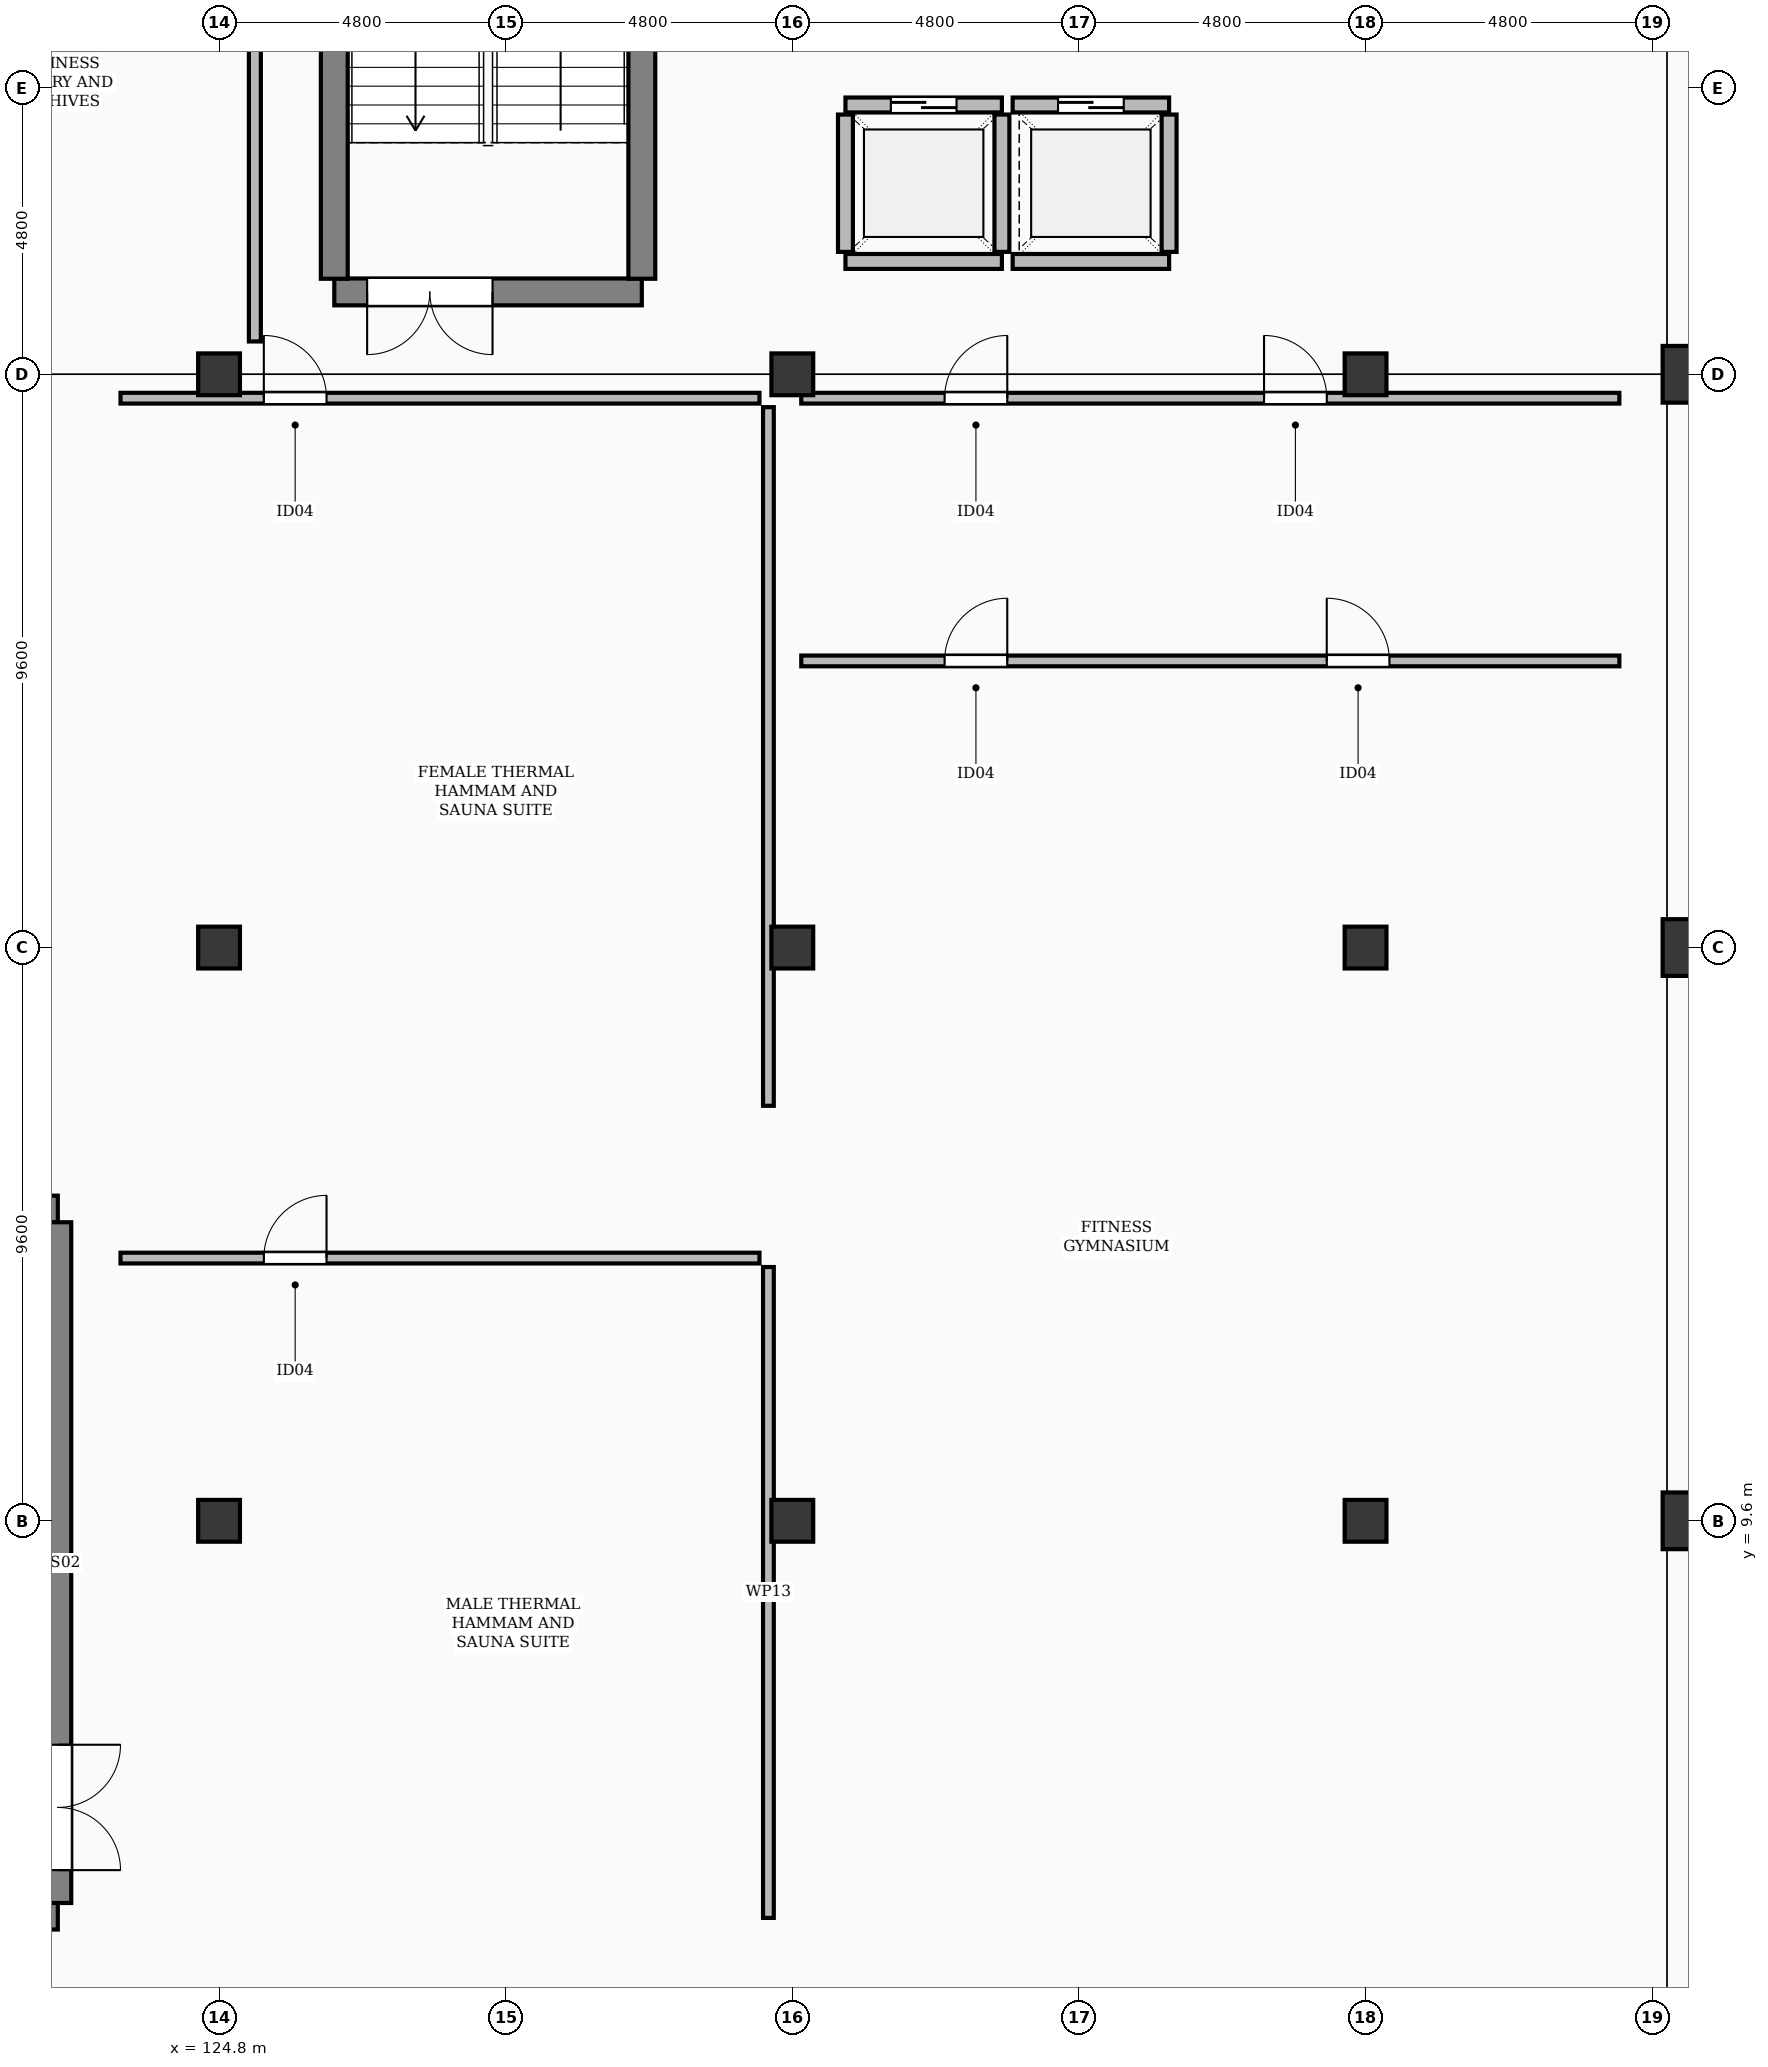
"""IFC4 building model, lengths in metres.
Left out: names, types, materials, properties, quantities, classifications, styles, units other than length and angle.
Written with IfcOpenShell. Run it as: python <this file> out.ifc"""

import sys

from ifc_helpers import new_model, si_unit, direction, frame, frame_2d, origin, origin_2d, place, context, subcontext, project, spatial, rectangle, extrude, element, fill, save


model = new_model("IFC4")
c1 = context("Model", 3, precision=1e-05, world=origin(), true_north=direction((0.0, 1.0)))
c2 = subcontext(c1, "Body", "Model", "MODEL_VIEW")
j1 = project(units=[si_unit("LENGTHUNIT", "METRE"), si_unit("PLANEANGLEUNIT", "RADIAN")], contexts=[c1])
p1 = place(None, origin())
s1 = spatial("IfcSite", under=j1, at=p1, CompositionType="ELEMENT")
p2 = place(p1, origin())
s2 = spatial("IfcBuilding", under=s1, at=p2, CompositionType="ELEMENT")
p3 = place(p2, frame((0.0, 0.0, 11.4)))
s3 = spatial("IfcBuildingStorey", under=s2, at=p3, CompositionType="ELEMENT", Elevation=11.4)
for number, where, z_axis, x_axis in (
    (1, (124.8, 9.6, 0.0), (0.0, 0.0, 1.0), (1.0, 0.0, 0.0)),
    (2, (124.8, 19.2, 0.0), (0.0, 0.0, 1.0), (1.0, 0.0, 0.0)),
    (3, (124.8, 28.8, 0.0), (0.0, 0.0, 1.0), (1.0, 0.0, 0.0)),
    (4, (134.4, 9.6, 0.0), (0.0, 0.0, 1.0), (1.0, 0.0, 0.0)),
    (5, (134.4, 19.2, 0.0), (0.0, 0.0, 1.0), (1.0, 0.0, 0.0)),
    (6, (134.4, 28.8, 0.0), (0.0, 0.0, 1.0), (1.0, 0.0, 0.0)),
    (7, (144.0, 9.6, 0.0), (0.0, 0.0, 1.0), (1.0, 0.0, 0.0)),
    (8, (144.0, 19.2, 0.0), (0.0, 0.0, 1.0), (1.0, 0.0, 0.0)),
    (9, (144.0, 28.8, 0.0), (0.0, 0.0, 1.0), (1.0, 0.0, 0.0)),
):
    element("IfcColumn", number, at=place(p3, frame(where, z_axis=z_axis, x_axis=x_axis)), inside=s3, PredefinedType="COLUMN", context=c2, shape_type="SweptSolid", body=[
        extrude(rectangle(XDim=0.7, YDim=0.7, at=origin_2d()), origin(), (0.0, 0.0, 1.0), 4.8),
    ])
for number, where, z_axis, x_axis in (
    (10, (149.45, 9.6, 0.0), (0.0, 0.0, 1.0), (1.0, 0.0, 0.0)),
    (11, (149.45, 19.2, 0.0), (0.0, 0.0, 1.0), (1.0, 0.0, 0.0)),
    (12, (149.45, 28.8, 0.0), (0.0, 0.0, 1.0), (1.0, 0.0, 0.0)),
):
    element("IfcColumn", number, at=place(p3, frame(where, z_axis=z_axis, x_axis=x_axis)), inside=s3, PredefinedType="COLUMN", context=c2, shape_type="SweptSolid", body=[
        extrude(rectangle(XDim=0.95, YDim=0.95, at=origin_2d()), origin(), (0.0, 0.0, 1.0), 4.8),
    ])
p4 = place(p3, frame((126.73, 30.18, 0.0), z_axis=(0.0, 0.0, 1.0), x_axis=(1.0, 0.0, 0.0)))
e13 = element("IfcWall", 13, at=p4, inside=s3, PredefinedType="SHEAR", context=c2, shape_type="SweptSolid", body=[
    extrude(rectangle(XDim=5.15, YDim=0.45, at=frame_2d((2.575, 0.0))), origin(), (0.0, 0.0, 1.0), 4.42),
])
p5 = place(p4, frame((0.55, 0.0, 0.0)))
e14 = element("IfcOpeningElement", 14, at=p5, cuts=e13, PredefinedType="OPENING", context=c2, shape_type="SweptSolid", body=[
    extrude(rectangle(XDim=2.1, YDim=2.2, at=frame_2d((1.05, 1.1))), frame((0.0, 0.237, 0.0), z_axis=(0.0, -1.0, 0.0), x_axis=(1.0, 0.0, 0.0)), (0.0, 0.0, 1.0), 0.474),
])
for number, where, z_axis, x_axis in (
    (15, (126.73, 30.4, 0.0), (0.0, 0.0, 1.0), (0.0, 1.0, 0.0)),
    (16, (131.88, 30.4, 0.0), (0.0, 0.0, 1.0), (0.0, 1.0, 0.0)),
):
    element("IfcWall", number, at=place(p3, frame(where, z_axis=z_axis, x_axis=x_axis)), inside=s3, PredefinedType="SHEAR", context=c2, shape_type="SweptSolid", body=[
        extrude(rectangle(XDim=11.6, YDim=0.45, at=frame_2d((5.8, 0.0))), origin(), (0.0, 0.0, 1.0), 4.42),
    ])
p6 = place(p3, frame((135.29, 30.69, 0.0), z_axis=(0.0, 0.0, 1.0), x_axis=(1.0, 0.0, 0.0)))
e17 = element("IfcWall", 17, at=p6, inside=s3, PredefinedType="SOLIDWALL", context=c2, shape_type="SweptSolid", body=[
    extrude(rectangle(XDim=2.62, YDim=0.25, at=frame_2d((1.31, 0.0))), origin(), (0.0, 0.0, 1.0), 4.42),
])
p7 = place(p3, frame((135.29, 33.31, 0.0), z_axis=(0.0, 0.0, 1.0), x_axis=(1.0, 0.0, 0.0)))
e18 = element("IfcWall", 18, at=p7, inside=s3, PredefinedType="SOLIDWALL", context=c2, shape_type="SweptSolid", body=[
    extrude(rectangle(XDim=2.62, YDim=0.25, at=frame_2d((1.31, 0.0))), origin(), (0.0, 0.0, 1.0), 4.42),
])
p8 = place(p7, frame((0.76, 0.0, 0.0)))
e19 = element("IfcOpeningElement", 19, at=p8, cuts=e18, PredefinedType="OPENING", context=c2, shape_type="SweptSolid", body=[
    extrude(rectangle(XDim=1.1, YDim=2.2, at=frame_2d((0.55, 1.1))), frame((0.0, 0.137, 0.0), z_axis=(0.0, -1.0, 0.0), x_axis=(1.0, 0.0, 0.0)), (0.0, 0.0, 1.0), 0.274),
])
for number, where, z_axis, x_axis in (
    (20, (135.29, 30.85, 0.0), (0.0, 0.0, 1.0), (0.0, 1.0, 0.0)),
    (21, (137.91, 30.85, 0.0), (0.0, 0.0, 1.0), (0.0, 1.0, 0.0)),
):
    element("IfcWall", number, at=place(p3, frame(where, z_axis=z_axis, x_axis=x_axis)), inside=s3, PredefinedType="SOLIDWALL", context=c2, shape_type="SweptSolid", body=[
        extrude(rectangle(XDim=2.3, YDim=0.25, at=frame_2d((1.15, 0.0))), origin(), (0.0, 0.0, 1.0), 4.42),
    ])
p9 = place(p3, frame((138.09, 30.69, 0.0), z_axis=(0.0, 0.0, 1.0), x_axis=(1.0, 0.0, 0.0)))
e22 = element("IfcWall", 22, at=p9, inside=s3, PredefinedType="SOLIDWALL", context=c2, shape_type="SweptSolid", body=[
    extrude(rectangle(XDim=2.62, YDim=0.25, at=frame_2d((1.31, 0.0))), origin(), (0.0, 0.0, 1.0), 4.42),
])
p10 = place(p3, frame((138.09, 33.31, 0.0), z_axis=(0.0, 0.0, 1.0), x_axis=(1.0, 0.0, 0.0)))
e23 = element("IfcWall", 23, at=p10, inside=s3, PredefinedType="SOLIDWALL", context=c2, shape_type="SweptSolid", body=[
    extrude(rectangle(XDim=2.62, YDim=0.25, at=frame_2d((1.31, 0.0))), origin(), (0.0, 0.0, 1.0), 4.42),
])
p11 = place(p10, frame((0.76, 0.0, 0.0)))
e24 = element("IfcOpeningElement", 24, at=p11, cuts=e23, PredefinedType="OPENING", context=c2, shape_type="SweptSolid", body=[
    extrude(rectangle(XDim=1.1, YDim=2.2, at=frame_2d((0.55, 1.1))), frame((0.0, 0.137, 0.0), z_axis=(0.0, -1.0, 0.0), x_axis=(1.0, 0.0, 0.0)), (0.0, 0.0, 1.0), 0.274),
])
p12 = place(p3, frame((140.71, 30.85, 0.0), z_axis=(0.0, 0.0, 1.0), x_axis=(0.0, 1.0, 0.0)))
e25 = element("IfcWall", 25, at=p12, inside=s3, PredefinedType="SOLIDWALL", context=c2, shape_type="SweptSolid", body=[
    extrude(rectangle(XDim=2.3, YDim=0.25, at=frame_2d((1.15, 0.0))), origin(), (0.0, 0.0, 1.0), 4.42),
])
for number, where, z_axis, x_axis in (
    (26, (116.95, 2.98, 0.0), (0.0, 0.0, 1.0), (1.0, 0.0, 0.0)),
    (27, (116.95, 14.82, 0.0), (0.0, 0.0, 1.0), (1.0, 0.0, 0.0)),
):
    element("IfcWall", number, at=place(p3, frame(where, z_axis=z_axis, x_axis=x_axis)), inside=s3, PredefinedType="SHEAR", context=c2, shape_type="SweptSolid", body=[
        extrude(rectangle(XDim=5.15, YDim=0.45, at=frame_2d((2.575, 0.0))), origin(), (0.0, 0.0, 1.0), 4.42),
    ])
p13 = place(p3, frame((122.1, 3.2, 0.0), z_axis=(0.0, 0.0, 1.0), x_axis=(0.0, 1.0, 0.0)))
e28 = element("IfcWall", 28, at=p13, inside=s3, PredefinedType="SHEAR", context=c2, shape_type="SweptSolid", body=[
    extrude(rectangle(XDim=11.4, YDim=0.45, at=frame_2d((5.7, 0.0))), origin(), (0.0, 0.0, 1.0), 4.42),
])
p14 = place(p13, frame((0.55, 0.0, 0.0)))
e29 = element("IfcOpeningElement", 29, at=p14, cuts=e28, PredefinedType="OPENING", context=c2, shape_type="SweptSolid", body=[
    extrude(rectangle(XDim=2.1, YDim=2.2, at=frame_2d((1.05, 1.1))), frame((0.0, 0.237, 0.0), z_axis=(0.0, -1.0, 0.0), x_axis=(1.0, 0.0, 0.0)), (0.0, 0.0, 1.0), 0.474),
])
p15 = place(p3, frame((125.4, 29.35, 0.0), z_axis=(0.0, 0.0, 1.0), x_axis=(0.0, 1.0, 0.0)))
e30 = element("IfcWall", 30, at=p15, inside=s3, PredefinedType="PARTITIONING", context=c2, shape_type="SweptSolid", body=[
    extrude(rectangle(XDim=11.1, YDim=0.2, at=frame_2d((5.55, 0.0))), origin(), (0.0, 0.0, 1.0), 4.42),
])
p16 = place(p3, frame((123.15, 14.0, 0.0), z_axis=(0.0, 0.0, 1.0), x_axis=(1.0, 0.0, 0.0)))
e31 = element("IfcWall", 31, at=p16, inside=s3, PredefinedType="PARTITIONING", context=c2, shape_type="SweptSolid", body=[
    extrude(rectangle(XDim=10.7, YDim=0.18, at=frame_2d((5.35, 0.0))), origin(), (0.0, 0.0, 1.0), 3.692),
])
p17 = place(p16, frame((2.4, 0.0, 0.0)))
e32 = element("IfcOpeningElement", 32, at=p17, cuts=e31, PredefinedType="OPENING", context=c2, shape_type="SweptSolid", body=[
    extrude(rectangle(XDim=1.05, YDim=2.18, at=frame_2d((0.525, 1.09))), frame((0.0, 0.102, 0.0), z_axis=(0.0, -1.0, 0.0), x_axis=(1.0, 0.0, 0.0)), (0.0, 0.0, 1.0), 0.204),
])
p18 = place(p3, frame((134.0, 2.95, 0.0), z_axis=(0.0, 0.0, 1.0), x_axis=(0.0, 1.0, 0.0)))
e33 = element("IfcWall", 33, at=p18, inside=s3, PredefinedType="PARTITIONING", context=c2, shape_type="SweptSolid", body=[
    extrude(rectangle(XDim=10.9, YDim=0.18, at=frame_2d((5.45, 0.0))), origin(), (0.0, 0.0, 1.0), 3.692),
])
p19 = place(p3, frame((123.15, 28.4, 0.0), z_axis=(0.0, 0.0, 1.0), x_axis=(1.0, 0.0, 0.0)))
e34 = element("IfcWall", 34, at=p19, inside=s3, PredefinedType="PARTITIONING", context=c2, shape_type="SweptSolid", body=[
    extrude(rectangle(XDim=10.7, YDim=0.18, at=frame_2d((5.35, 0.0))), origin(), (0.0, 0.0, 1.0), 3.692),
])
p20 = place(p19, frame((2.4, 0.0, 0.0)))
e35 = element("IfcOpeningElement", 35, at=p20, cuts=e34, PredefinedType="OPENING", context=c2, shape_type="SweptSolid", body=[
    extrude(rectangle(XDim=1.05, YDim=2.18, at=frame_2d((0.525, 1.09))), frame((0.0, 0.102, 0.0), z_axis=(0.0, -1.0, 0.0), x_axis=(1.0, 0.0, 0.0)), (0.0, 0.0, 1.0), 0.204),
])
p21 = place(p3, frame((134.0, 16.55, 0.0), z_axis=(0.0, 0.0, 1.0), x_axis=(0.0, 1.0, 0.0)))
e36 = element("IfcWall", 36, at=p21, inside=s3, PredefinedType="PARTITIONING", context=c2, shape_type="SweptSolid", body=[
    extrude(rectangle(XDim=11.7, YDim=0.18, at=frame_2d((5.85, 0.0))), origin(), (0.0, 0.0, 1.0), 3.692),
])
p22 = place(p3, frame((134.55, 24.0, 0.0), z_axis=(0.0, 0.0, 1.0), x_axis=(1.0, 0.0, 0.0)))
e37 = element("IfcWall", 37, at=p22, inside=s3, PredefinedType="PARTITIONING", context=c2, shape_type="SweptSolid", body=[
    extrude(rectangle(XDim=13.7, YDim=0.18, at=frame_2d((6.85, 0.0))), origin(), (0.0, 0.0, 1.0), 3.692),
])
p23 = place(p22, frame((2.4, 0.0, 0.0)))
e38 = element("IfcOpeningElement", 38, at=p23, cuts=e37, PredefinedType="OPENING", context=c2, shape_type="SweptSolid", body=[
    extrude(rectangle(XDim=1.05, YDim=2.18, at=frame_2d((0.525, 1.09))), frame((0.0, 0.102, 0.0), z_axis=(0.0, -1.0, 0.0), x_axis=(1.0, 0.0, 0.0)), (0.0, 0.0, 1.0), 0.204),
])
p24 = place(p22, frame((8.8, 0.0, 0.0)))
e39 = element("IfcOpeningElement", 39, at=p24, cuts=e37, PredefinedType="OPENING", context=c2, shape_type="SweptSolid", body=[
    extrude(rectangle(XDim=1.05, YDim=2.18, at=frame_2d((0.525, 1.09))), frame((0.0, 0.102, 0.0), z_axis=(0.0, -1.0, 0.0), x_axis=(1.0, 0.0, 0.0)), (0.0, 0.0, 1.0), 0.204),
])
p25 = place(p3, frame((134.55, 28.4, 0.0), z_axis=(0.0, 0.0, 1.0), x_axis=(1.0, 0.0, 0.0)))
e40 = element("IfcWall", 40, at=p25, inside=s3, PredefinedType="PARTITIONING", context=c2, shape_type="SweptSolid", body=[
    extrude(rectangle(XDim=13.7, YDim=0.18, at=frame_2d((6.85, 0.0))), origin(), (0.0, 0.0, 1.0), 3.692),
])
p26 = place(p25, frame((2.4, 0.0, 0.0)))
e41 = element("IfcOpeningElement", 41, at=p26, cuts=e40, PredefinedType="OPENING", context=c2, shape_type="SweptSolid", body=[
    extrude(rectangle(XDim=1.05, YDim=2.18, at=frame_2d((0.525, 1.09))), frame((0.0, 0.102, 0.0), z_axis=(0.0, -1.0, 0.0), x_axis=(1.0, 0.0, 0.0)), (0.0, 0.0, 1.0), 0.204),
])
p27 = place(p25, frame((7.75, 0.0, 0.0)))
e42 = element("IfcOpeningElement", 42, at=p27, cuts=e40, PredefinedType="OPENING", context=c2, shape_type="SweptSolid", body=[
    extrude(rectangle(XDim=1.05, YDim=2.18, at=frame_2d((0.525, 1.09))), frame((0.0, 0.102, 0.0), z_axis=(0.0, -1.0, 0.0), x_axis=(1.0, 0.0, 0.0)), (0.0, 0.0, 1.0), 0.204),
])
p28 = place(p5, frame((2.1, 0.0, 0.0), z_axis=(0.0, 0.0, 1.0), x_axis=(-1.0, 0.0, 0.0)))
e43 = element("IfcDoor", 43, at=p28, inside=s3, OperationType="DOUBLE_DOOR_SINGLE_SWING", PredefinedType="DOOR", context=c2, shape_type="SweptSolid", body=[
    extrude(rectangle(XDim=2.1, YDim=2.2, at=frame_2d((1.05, 1.1))), frame((0.0, 0.025, 0.0), z_axis=(0.0, -1.0, 0.0), x_axis=(1.0, 0.0, 0.0)), (0.0, 0.0, 1.0), 0.05),
])
fill(e14, e43)
p29 = place(p8, origin())
e44 = element("IfcDoor", 44, at=p29, inside=s3, OperationType="SLIDING_TO_LEFT", PredefinedType="DOOR", context=c2, shape_type="SweptSolid", body=[
    extrude(rectangle(XDim=1.1, YDim=2.2, at=frame_2d((0.55, 1.1))), frame((0.0, 0.025, 0.0), z_axis=(0.0, -1.0, 0.0), x_axis=(1.0, 0.0, 0.0)), (0.0, 0.0, 1.0), 0.05),
])
fill(e19, e44)
p30 = place(p11, origin())
e45 = element("IfcDoor", 45, at=p30, inside=s3, OperationType="SLIDING_TO_LEFT", PredefinedType="DOOR", context=c2, shape_type="SweptSolid", body=[
    extrude(rectangle(XDim=1.1, YDim=2.2, at=frame_2d((0.55, 1.1))), frame((0.0, 0.025, 0.0), z_axis=(0.0, -1.0, 0.0), x_axis=(1.0, 0.0, 0.0)), (0.0, 0.0, 1.0), 0.05),
])
fill(e24, e45)
p31 = place(p14, frame((2.1, 0.0, 0.0), z_axis=(0.0, 0.0, 1.0), x_axis=(-1.0, 0.0, 0.0)))
e46 = element("IfcDoor", 46, at=p31, inside=s3, OperationType="DOUBLE_DOOR_SINGLE_SWING", PredefinedType="DOOR", context=c2, shape_type="SweptSolid", body=[
    extrude(rectangle(XDim=2.1, YDim=2.2, at=frame_2d((1.05, 1.1))), frame((0.0, 0.025, 0.0), z_axis=(0.0, -1.0, 0.0), x_axis=(1.0, 0.0, 0.0)), (0.0, 0.0, 1.0), 0.05),
])
fill(e29, e46)
p32 = place(p17, origin())
e47 = element("IfcDoor", 47, at=p32, inside=s3, OperationType="SINGLE_SWING_RIGHT", PredefinedType="DOOR", context=c2, shape_type="SweptSolid", body=[
    extrude(rectangle(XDim=1.05, YDim=2.18, at=frame_2d((0.525, 1.09))), frame((0.0, 0.025, 0.0), z_axis=(0.0, -1.0, 0.0), x_axis=(1.0, 0.0, 0.0)), (0.0, 0.0, 1.0), 0.05),
])
fill(e32, e47)
p33 = place(p20, origin())
e48 = element("IfcDoor", 48, at=p33, inside=s3, OperationType="SINGLE_SWING_LEFT", PredefinedType="DOOR", context=c2, shape_type="SweptSolid", body=[
    extrude(rectangle(XDim=1.05, YDim=2.18, at=frame_2d((0.525, 1.09))), frame((0.0, 0.025, 0.0), z_axis=(0.0, -1.0, 0.0), x_axis=(1.0, 0.0, 0.0)), (0.0, 0.0, 1.0), 0.05),
])
fill(e35, e48)
p34 = place(p23, origin())
e49 = element("IfcDoor", 49, at=p34, inside=s3, OperationType="SINGLE_SWING_RIGHT", PredefinedType="DOOR", context=c2, shape_type="SweptSolid", body=[
    extrude(rectangle(XDim=1.05, YDim=2.18, at=frame_2d((0.525, 1.09))), frame((0.0, 0.025, 0.0), z_axis=(0.0, -1.0, 0.0), x_axis=(1.0, 0.0, 0.0)), (0.0, 0.0, 1.0), 0.05),
])
fill(e38, e49)
p35 = place(p24, origin())
e50 = element("IfcDoor", 50, at=p35, inside=s3, OperationType="SINGLE_SWING_LEFT", PredefinedType="DOOR", context=c2, shape_type="SweptSolid", body=[
    extrude(rectangle(XDim=1.05, YDim=2.18, at=frame_2d((0.525, 1.09))), frame((0.0, 0.025, 0.0), z_axis=(0.0, -1.0, 0.0), x_axis=(1.0, 0.0, 0.0)), (0.0, 0.0, 1.0), 0.05),
])
fill(e39, e50)
p36 = place(p26, origin())
e51 = element("IfcDoor", 51, at=p36, inside=s3, OperationType="SINGLE_SWING_RIGHT", PredefinedType="DOOR", context=c2, shape_type="SweptSolid", body=[
    extrude(rectangle(XDim=1.05, YDim=2.18, at=frame_2d((0.525, 1.09))), frame((0.0, 0.025, 0.0), z_axis=(0.0, -1.0, 0.0), x_axis=(1.0, 0.0, 0.0)), (0.0, 0.0, 1.0), 0.05),
])
fill(e41, e51)
p37 = place(p27, origin())
e52 = element("IfcDoor", 52, at=p37, inside=s3, OperationType="SINGLE_SWING_LEFT", PredefinedType="DOOR", context=c2, shape_type="SweptSolid", body=[
    extrude(rectangle(XDim=1.05, YDim=2.18, at=frame_2d((0.525, 1.09))), frame((0.0, 0.025, 0.0), z_axis=(0.0, -1.0, 0.0), x_axis=(1.0, 0.0, 0.0)), (0.0, 0.0, 1.0), 0.05),
])
fill(e42, e52)
save(model, sys.argv[1])
